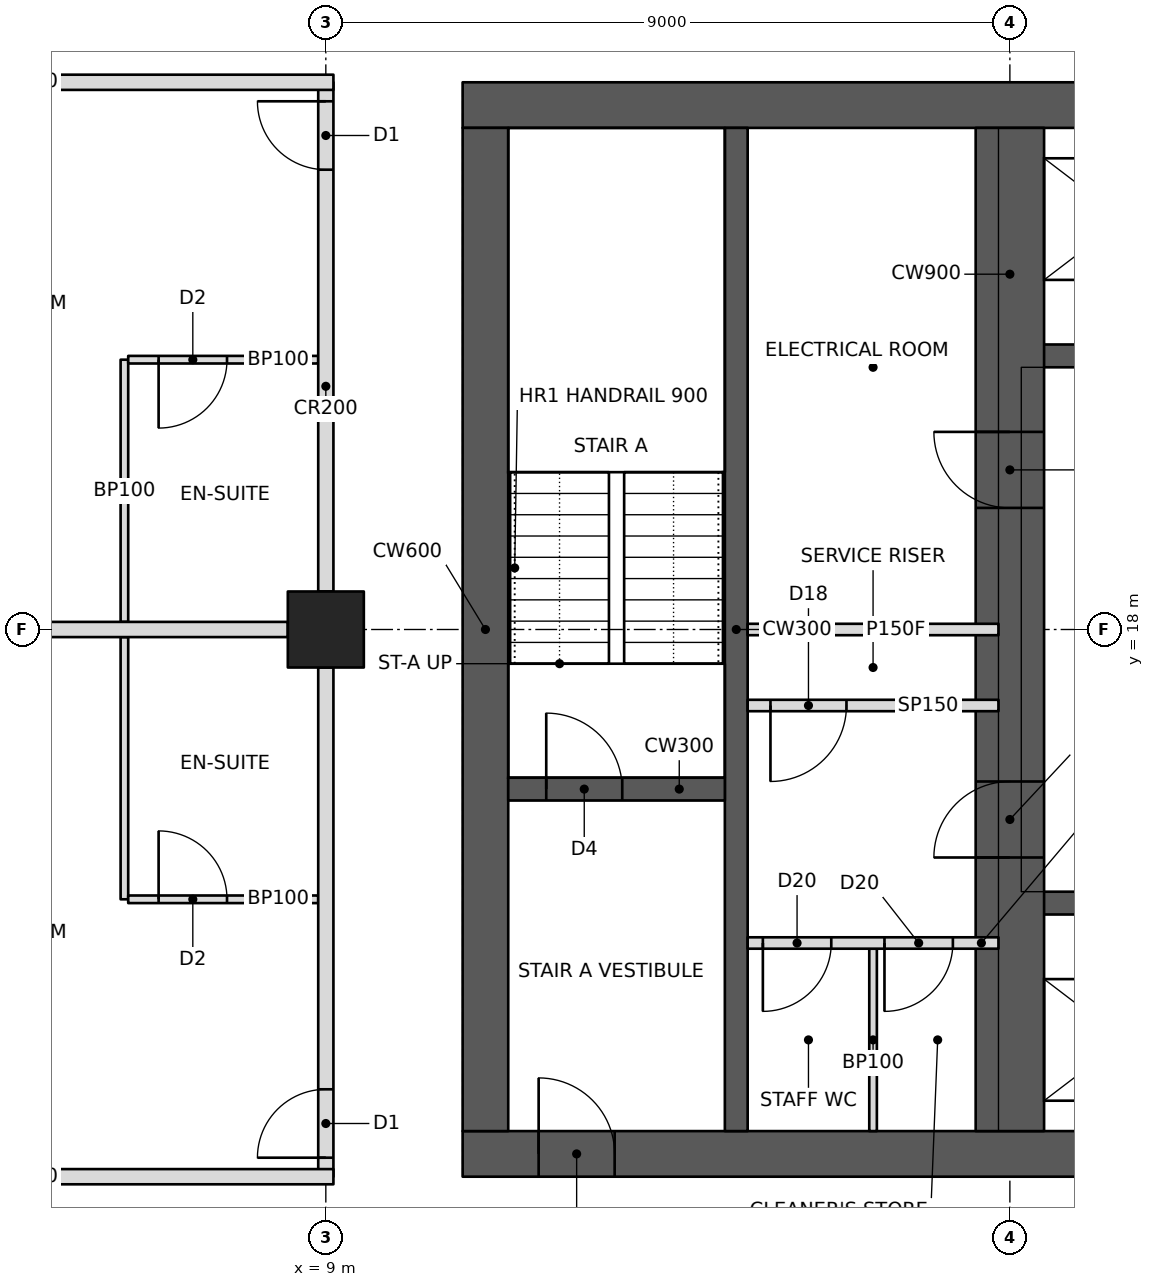
"""IFC4 building model, lengths in metres.
Left out: names, types, materials, properties, quantities, classifications, styles, units other than length and angle.
Written with IfcOpenShell. Run it as: python <this file> out.ifc"""

import sys

from ifc_helpers import new_model, si_unit, direction, frame, frame_2d, origin, origin_2d, place, context, subcontext, project, spatial, rectangle, hollow_rectangle, extrude, element, fill, save


model = new_model("IFC4")
c1 = context("Model", 3, precision=1e-05, world=origin(), true_north=direction((0.0, 1.0)))
c2 = subcontext(c1, "Body", "Model", "MODEL_VIEW")
j1 = project(units=[si_unit("LENGTHUNIT", "METRE"), si_unit("PLANEANGLEUNIT", "RADIAN")], contexts=[c1])
p1 = place(None, origin())
s1 = spatial("IfcSite", under=j1, at=p1, CompositionType="ELEMENT")
p2 = place(p1, origin())
s2 = spatial("IfcBuilding", under=s1, at=p2, CompositionType="ELEMENT")
p3 = place(p2, frame((0.0, 0.0, 94.2)))
s3 = spatial("IfcBuildingStorey", under=s2, at=p3, CompositionType="ELEMENT", Elevation=94.2)
p4 = place(p3, frame((9.0, 18.0, 0.0), z_axis=(0.0, 0.0, 1.0), x_axis=(1.0, 0.0, 0.0)))
e1 = element("IfcColumn", 1, at=p4, inside=s3, PredefinedType="COLUMN", context=c2, shape_type="SweptSolid", body=[
    extrude(hollow_rectangle(XDim=1.0, YDim=1.0, WallThickness=0.1, at=origin_2d()), origin(), (0.0, 0.0, 1.0), 3.4),
])
p5 = place(p3, frame((10.8, 11.1, 0.0), z_axis=(0.0, 0.0, 1.0), x_axis=(1.0, 0.0, 0.0)))
e2 = element("IfcWall", 2, at=p5, inside=s3, PredefinedType="SHEAR", context=c2, shape_type="SweptSolid", body=[
    extrude(rectangle(XDim=23.4, YDim=0.6, at=frame_2d((11.7, 0.0))), origin(), (0.0, 0.0, 1.0), 3.4),
])
p6 = place(p5, frame((1.0, 0.0, 0.0)))
e3 = element("IfcOpeningElement", 3, at=p6, cuts=e2, PredefinedType="OPENING", context=c2, shape_type="SweptSolid", body=[
    extrude(rectangle(XDim=1.0, YDim=2.1, at=frame_2d((0.5, 1.05))), frame((0.0, 0.31, 0.0), z_axis=(0.0, -1.0, 0.0), x_axis=(1.0, 0.0, 0.0)), (0.0, 0.0, 1.0), 0.62),
])
p7 = place(p5, frame((17.2, 0.0, 0.0)))
e4 = element("IfcOpeningElement", 4, at=p7, cuts=e2, PredefinedType="OPENING", context=c2, shape_type="SweptSolid", body=[
    extrude(rectangle(XDim=1.8, YDim=2.1, at=frame_2d((0.9, 1.05))), frame((0.0, 0.31, 0.0), z_axis=(0.0, -1.0, 0.0), x_axis=(1.0, 0.0, 0.0)), (0.0, 0.0, 1.0), 0.62),
])
p8 = place(p3, frame((10.8, 24.9, 0.0), z_axis=(0.0, 0.0, 1.0), x_axis=(1.0, 0.0, 0.0)))
e5 = element("IfcWall", 5, at=p8, inside=s3, PredefinedType="SHEAR", context=c2, shape_type="SweptSolid", body=[
    extrude(rectangle(XDim=23.4, YDim=0.6, at=frame_2d((11.7, 0.0))), origin(), (0.0, 0.0, 1.0), 3.4),
])
p9 = place(p8, frame((17.2, 0.0, 0.0)))
e6 = element("IfcOpeningElement", 6, at=p9, cuts=e5, PredefinedType="OPENING", context=c2, shape_type="SweptSolid", body=[
    extrude(rectangle(XDim=1.8, YDim=2.1, at=frame_2d((0.9, 1.05))), frame((0.0, 0.31, 0.0), z_axis=(0.0, -1.0, 0.0), x_axis=(1.0, 0.0, 0.0)), (0.0, 0.0, 1.0), 0.62),
])
p10 = place(p8, frame((21.1, 0.0, 0.0)))
e7 = element("IfcOpeningElement", 7, at=p10, cuts=e5, PredefinedType="OPENING", context=c2, shape_type="SweptSolid", body=[
    extrude(rectangle(XDim=1.0, YDim=2.1, at=frame_2d((0.5, 1.05))), frame((0.0, 0.31, 0.0), z_axis=(0.0, -1.0, 0.0), x_axis=(1.0, 0.0, 0.0)), (0.0, 0.0, 1.0), 0.62),
])
p11 = place(p3, frame((11.1, 11.4, 0.0), z_axis=(0.0, 0.0, 1.0), x_axis=(0.0, 1.0, 0.0)))
e8 = element("IfcWall", 8, at=p11, inside=s3, PredefinedType="SHEAR", context=c2, shape_type="SweptSolid", body=[
    extrude(rectangle(XDim=13.2, YDim=0.6, at=frame_2d((6.6, 0.0))), origin(), (0.0, 0.0, 1.0), 3.4),
])
p12 = place(p3, frame((14.4, 11.4, 0.0), z_axis=(0.0, 0.0, 1.0), x_axis=(0.0, 1.0, 0.0)))
e9 = element("IfcWall", 9, at=p12, inside=s3, PredefinedType="SHEAR", context=c2, shape_type="SweptSolid", body=[
    extrude(rectangle(XDim=13.2, YDim=0.3, at=frame_2d((6.6, 0.0))), origin(), (0.0, 0.0, 1.0), 3.4),
])
p13 = place(p3, frame((11.4, 15.9, 0.0), z_axis=(0.0, 0.0, 1.0), x_axis=(1.0, 0.0, 0.0)))
e10 = element("IfcWall", 10, at=p13, inside=s3, PredefinedType="SHEAR", context=c2, shape_type="SweptSolid", body=[
    extrude(rectangle(XDim=2.85, YDim=0.3, at=frame_2d((1.425, 0.0))), origin(), (0.0, 0.0, 1.0), 3.4),
])
p14 = place(p13, frame((0.5, 0.0, 0.0)))
e11 = element("IfcOpeningElement", 11, at=p14, cuts=e10, PredefinedType="OPENING", context=c2, shape_type="SweptSolid", body=[
    extrude(rectangle(XDim=1.0, YDim=2.1, at=frame_2d((0.5, 1.05))), frame((0.0, 0.16, 0.0), z_axis=(0.0, -1.0, 0.0), x_axis=(1.0, 0.0, 0.0)), (0.0, 0.0, 1.0), 0.32),
])
p15 = place(p3, frame((18.0, 11.4, 0.0), z_axis=(0.0, 0.0, 1.0), x_axis=(0.0, 1.0, 0.0)))
e12 = element("IfcWall", 12, at=p15, inside=s3, PredefinedType="SHEAR", context=c2, shape_type="SweptSolid", body=[
    extrude(rectangle(XDim=13.2, YDim=0.9, at=frame_2d((6.6, 0.0))), origin(), (0.0, 0.0, 1.0), 3.4),
])
p16 = place(p15, frame((3.6, 0.0, 0.0)))
e13 = element("IfcOpeningElement", 13, at=p16, cuts=e12, PredefinedType="OPENING", context=c2, shape_type="SweptSolid", body=[
    extrude(rectangle(XDim=1.0, YDim=2.1, at=frame_2d((0.5, 1.05))), frame((0.0, 0.46, 0.0), z_axis=(0.0, -1.0, 0.0), x_axis=(1.0, 0.0, 0.0)), (0.0, 0.0, 1.0), 0.92),
])
p17 = place(p15, frame((8.2, 0.0, 0.0)))
e14 = element("IfcOpeningElement", 14, at=p17, cuts=e12, PredefinedType="OPENING", context=c2, shape_type="SweptSolid", body=[
    extrude(rectangle(XDim=1.0, YDim=2.1, at=frame_2d((0.5, 1.05))), frame((0.0, 0.46, 0.0), z_axis=(0.0, -1.0, 0.0), x_axis=(1.0, 0.0, 0.0)), (0.0, 0.0, 1.0), 0.92),
])
p18 = place(p3, frame((14.55, 18.0, 0.0), z_axis=(0.0, 0.0, 1.0), x_axis=(1.0, 0.0, 0.0)))
e15 = element("IfcWall", 15, at=p18, inside=s3, PredefinedType="PARTITIONING", context=c2, shape_type="SweptSolid", body=[
    extrude(rectangle(XDim=3.3, YDim=0.15, at=frame_2d((1.65, 0.0))), origin(), (0.0, 0.0, 1.0), 3.2),
])
p19 = place(p3, frame((18.15, 14.4, 0.0), z_axis=(0.0, 0.0, 1.0), x_axis=(1.0, 0.0, 0.0)))
e16 = element("IfcWall", 16, at=p19, inside=s3, PredefinedType="SHEAR", context=c2, shape_type="SweptSolid", body=[
    extrude(rectangle(XDim=9.0, YDim=0.3, at=frame_2d((4.5, 0.0))), origin(), (0.0, 0.0, 1.0), 3.4),
])
p20 = place(p19, frame((0.8, 0.0, 0.0)))
e17 = element("IfcOpeningElement", 17, at=p20, cuts=e16, PredefinedType="OPENING", context=c2, shape_type="SweptSolid", body=[
    extrude(rectangle(XDim=1.1, YDim=2.1, at=frame_2d((0.55, 1.05))), frame((0.0, 0.16, 0.0), z_axis=(0.0, -1.0, 0.0), x_axis=(1.0, 0.0, 0.0)), (0.0, 0.0, 1.0), 0.32),
])
p21 = place(p19, frame((3.8, 0.0, 0.0)))
e18 = element("IfcOpeningElement", 18, at=p21, cuts=e16, PredefinedType="OPENING", context=c2, shape_type="SweptSolid", body=[
    extrude(rectangle(XDim=1.1, YDim=2.1, at=frame_2d((0.55, 1.05))), frame((0.0, 0.16, 0.0), z_axis=(0.0, -1.0, 0.0), x_axis=(1.0, 0.0, 0.0)), (0.0, 0.0, 1.0), 0.32),
])
p22 = place(p19, frame((6.75, 0.0, 0.0)))
e19 = element("IfcOpeningElement", 19, at=p22, cuts=e16, PredefinedType="OPENING", context=c2, shape_type="SweptSolid", body=[
    extrude(rectangle(XDim=1.2, YDim=2.1, at=frame_2d((0.6, 1.05))), frame((0.0, 0.16, 0.0), z_axis=(0.0, -1.0, 0.0), x_axis=(1.0, 0.0, 0.0)), (0.0, 0.0, 1.0), 0.32),
])
p23 = place(p3, frame((18.15, 21.6, 0.0), z_axis=(0.0, 0.0, 1.0), x_axis=(1.0, 0.0, 0.0)))
e20 = element("IfcWall", 20, at=p23, inside=s3, PredefinedType="SHEAR", context=c2, shape_type="SweptSolid", body=[
    extrude(rectangle(XDim=9.0, YDim=0.3, at=frame_2d((4.5, 0.0))), origin(), (0.0, 0.0, 1.0), 3.4),
])
p24 = place(p23, frame((0.8, 0.0, 0.0)))
e21 = element("IfcOpeningElement", 21, at=p24, cuts=e20, PredefinedType="OPENING", context=c2, shape_type="SweptSolid", body=[
    extrude(rectangle(XDim=1.1, YDim=2.1, at=frame_2d((0.55, 1.05))), frame((0.0, 0.16, 0.0), z_axis=(0.0, -1.0, 0.0), x_axis=(1.0, 0.0, 0.0)), (0.0, 0.0, 1.0), 0.32),
])
p25 = place(p23, frame((3.8, 0.0, 0.0)))
e22 = element("IfcOpeningElement", 22, at=p25, cuts=e20, PredefinedType="OPENING", context=c2, shape_type="SweptSolid", body=[
    extrude(rectangle(XDim=1.1, YDim=2.1, at=frame_2d((0.55, 1.05))), frame((0.0, 0.16, 0.0), z_axis=(0.0, -1.0, 0.0), x_axis=(1.0, 0.0, 0.0)), (0.0, 0.0, 1.0), 0.32),
])
p26 = place(p23, frame((6.75, 0.0, 0.0)))
e23 = element("IfcOpeningElement", 23, at=p26, cuts=e20, PredefinedType="OPENING", context=c2, shape_type="SweptSolid", body=[
    extrude(rectangle(XDim=1.2, YDim=2.1, at=frame_2d((0.6, 1.05))), frame((0.0, 0.16, 0.0), z_axis=(0.0, -1.0, 0.0), x_axis=(1.0, 0.0, 0.0)), (0.0, 0.0, 1.0), 0.32),
])
p27 = place(p3, frame((9.0, 10.8, 0.0), z_axis=(0.0, 0.0, 1.0), x_axis=(0.0, 1.0, 0.0)))
e24 = element("IfcWall", 24, at=p27, inside=s3, PredefinedType="PARTITIONING", context=c2, shape_type="SweptSolid", body=[
    extrude(rectangle(XDim=6.7, YDim=0.2, at=frame_2d((3.35, 0.0))), origin(), (0.0, 0.0, 1.0), 2.405),
])
p28 = place(p27, frame((0.25, 0.0, 0.0)))
e25 = element("IfcOpeningElement", 25, at=p28, cuts=e24, PredefinedType="OPENING", context=c2, shape_type="SweptSolid", body=[
    extrude(rectangle(XDim=0.9, YDim=2.1, at=frame_2d((0.45, 1.05))), frame((0.0, 0.11, 0.0), z_axis=(0.0, -1.0, 0.0), x_axis=(1.0, 0.0, 0.0)), (0.0, 0.0, 1.0), 0.22),
])
p29 = place(p3, frame((9.0, 18.5, 0.0), z_axis=(0.0, 0.0, 1.0), x_axis=(0.0, 1.0, 0.0)))
e26 = element("IfcWall", 26, at=p29, inside=s3, PredefinedType="PARTITIONING", context=c2, shape_type="SweptSolid", body=[
    extrude(rectangle(XDim=6.7, YDim=0.2, at=frame_2d((3.35, 0.0))), origin(), (0.0, 0.0, 1.0), 2.405),
])
p30 = place(p29, frame((5.55, 0.0, 0.0)))
e27 = element("IfcOpeningElement", 27, at=p30, cuts=e26, PredefinedType="OPENING", context=c2, shape_type="SweptSolid", body=[
    extrude(rectangle(XDim=0.9, YDim=2.1, at=frame_2d((0.45, 1.05))), frame((0.0, 0.11, 0.0), z_axis=(0.0, -1.0, 0.0), x_axis=(1.0, 0.0, 0.0)), (0.0, 0.0, 1.0), 0.22),
])
for number, where, z_axis, x_axis in (
    (28, (1.0, 10.8, 0.0), (0.0, 0.0, 1.0), (1.0, 0.0, 0.0)),
    (29, (1.0, 25.2, 0.0), (0.0, 0.0, 1.0), (1.0, 0.0, 0.0)),
):
    element("IfcWall", number, at=place(p3, frame(where, z_axis=z_axis, x_axis=x_axis)), inside=s3, PredefinedType="PARTITIONING", context=c2, shape_type="SweptSolid", body=[
        extrude(rectangle(XDim=8.1, YDim=0.2, at=frame_2d((4.05, 0.0))), origin(), (0.0, 0.0, 1.0), 2.404),
    ])
p31 = place(p3, frame((8.5, 18.0, 0.0), z_axis=(0.0, 0.0, 1.0), x_axis=(-1.0, 0.0, 0.0)))
e30 = element("IfcWall", 30, at=p31, inside=s3, PredefinedType="PARTITIONING", context=c2, shape_type="SweptSolid", body=[
    extrude(rectangle(XDim=7.5, YDim=0.2, at=frame_2d((3.75, 0.0))), origin(), (0.0, 0.0, 1.0), 2.405),
])
p32 = place(p3, frame((6.35, 14.45, 0.0), z_axis=(0.0, 0.0, 1.0), x_axis=(0.0, 1.0, 0.0)))
e31 = element("IfcWall", 31, at=p32, inside=s3, PredefinedType="PARTITIONING", context=c2, shape_type="SweptSolid", body=[
    extrude(rectangle(XDim=3.45, YDim=0.1, at=frame_2d((1.725, 0.0))), origin(), (0.0, 0.0, 1.0), 2.404),
])
p33 = place(p3, frame((8.9, 14.45, 0.0), z_axis=(0.0, 0.0, 1.0), x_axis=(-1.0, 0.0, 0.0)))
e32 = element("IfcWall", 32, at=p33, inside=s3, PredefinedType="PARTITIONING", context=c2, shape_type="SweptSolid", body=[
    extrude(rectangle(XDim=2.5, YDim=0.1, at=frame_2d((1.25, 0.0))), origin(), (0.0, 0.0, 1.0), 2.404),
])
p34 = place(p33, frame((1.2, 0.0, 0.0)))
e33 = element("IfcOpeningElement", 33, at=p34, cuts=e32, PredefinedType="OPENING", context=c2, shape_type="SweptSolid", body=[
    extrude(rectangle(XDim=0.9, YDim=2.1, at=frame_2d((0.45, 1.05))), frame((0.0, 0.06, 0.0), z_axis=(0.0, -1.0, 0.0), x_axis=(1.0, 0.0, 0.0)), (0.0, 0.0, 1.0), 0.12),
])
p35 = place(p3, frame((6.35, 18.1, 0.0), z_axis=(0.0, 0.0, 1.0), x_axis=(0.0, 1.0, 0.0)))
e34 = element("IfcWall", 34, at=p35, inside=s3, PredefinedType="PARTITIONING", context=c2, shape_type="SweptSolid", body=[
    extrude(rectangle(XDim=3.45, YDim=0.1, at=frame_2d((1.725, 0.0))), origin(), (0.0, 0.0, 1.0), 2.404),
])
p36 = place(p3, frame((8.9, 21.55, 0.0), z_axis=(0.0, 0.0, 1.0), x_axis=(-1.0, 0.0, 0.0)))
e35 = element("IfcWall", 35, at=p36, inside=s3, PredefinedType="PARTITIONING", context=c2, shape_type="SweptSolid", body=[
    extrude(rectangle(XDim=2.5, YDim=0.1, at=frame_2d((1.25, 0.0))), origin(), (0.0, 0.0, 1.0), 2.404),
])
p37 = place(p36, frame((1.2, 0.0, 0.0)))
e36 = element("IfcOpeningElement", 36, at=p37, cuts=e35, PredefinedType="OPENING", context=c2, shape_type="SweptSolid", body=[
    extrude(rectangle(XDim=0.9, YDim=2.1, at=frame_2d((0.45, 1.05))), frame((0.0, 0.06, 0.0), z_axis=(0.0, -1.0, 0.0), x_axis=(1.0, 0.0, 0.0)), (0.0, 0.0, 1.0), 0.12),
])
p38 = place(p3, frame((14.55, 17.0, 0.0), z_axis=(0.0, 0.0, 1.0), x_axis=(1.0, 0.0, 0.0)))
e37 = element("IfcWall", 37, at=p38, inside=s3, PredefinedType="PARTITIONING", context=c2, shape_type="SweptSolid", body=[
    extrude(rectangle(XDim=3.3, YDim=0.15, at=frame_2d((1.65, 0.0))), origin(), (0.0, 0.0, 1.0), 3.2),
])
p39 = place(p38, frame((0.3, 0.0, 0.0)))
e38 = element("IfcOpeningElement", 38, at=p39, cuts=e37, PredefinedType="OPENING", context=c2, shape_type="SweptSolid", body=[
    extrude(rectangle(XDim=1.0, YDim=2.1, at=frame_2d((0.5, 1.05))), frame((0.0, 0.085, 0.0), z_axis=(0.0, -1.0, 0.0), x_axis=(1.0, 0.0, 0.0)), (0.0, 0.0, 1.0), 0.17),
])
p40 = place(p3, frame((14.55, 13.875, 0.0), z_axis=(0.0, 0.0, 1.0), x_axis=(1.0, 0.0, 0.0)))
e39 = element("IfcWall", 39, at=p40, inside=s3, PredefinedType="PARTITIONING", context=c2, shape_type="SweptSolid", body=[
    extrude(rectangle(XDim=3.3, YDim=0.15, at=frame_2d((1.65, 0.0))), origin(), (0.0, 0.0, 1.0), 3.2),
])
p41 = place(p40, frame((0.2, 0.0, 0.0)))
e40 = element("IfcOpeningElement", 40, at=p41, cuts=e39, PredefinedType="OPENING", context=c2, shape_type="SweptSolid", body=[
    extrude(rectangle(XDim=0.9, YDim=2.1, at=frame_2d((0.45, 1.05))), frame((0.0, 0.085, 0.0), z_axis=(0.0, -1.0, 0.0), x_axis=(1.0, 0.0, 0.0)), (0.0, 0.0, 1.0), 0.17),
])
p42 = place(p40, frame((1.8, 0.0, 0.0)))
e41 = element("IfcOpeningElement", 41, at=p42, cuts=e39, PredefinedType="OPENING", context=c2, shape_type="SweptSolid", body=[
    extrude(rectangle(XDim=0.9, YDim=2.1, at=frame_2d((0.45, 1.05))), frame((0.0, 0.085, 0.0), z_axis=(0.0, -1.0, 0.0), x_axis=(1.0, 0.0, 0.0)), (0.0, 0.0, 1.0), 0.17),
])
p43 = place(p3, frame((16.2, 11.4, 0.0), z_axis=(0.0, 0.0, 1.0), x_axis=(0.0, 1.0, 0.0)))
e42 = element("IfcWall", 42, at=p43, inside=s3, PredefinedType="PARTITIONING", context=c2, shape_type="SweptSolid", body=[
    extrude(rectangle(XDim=2.4, YDim=0.1, at=frame_2d((1.2, 0.0))), origin(), (0.0, 0.0, 1.0), 3.2),
])
p44 = place(p34, frame((0.9, 0.0, 0.0), z_axis=(0.0, 0.0, 1.0), x_axis=(-1.0, 0.0, 0.0)))
e43 = element("IfcDoor", 43, at=p44, inside=s3, OperationType="SINGLE_SWING_LEFT", PredefinedType="DOOR", context=c2, shape_type="SweptSolid", body=[
    extrude(rectangle(XDim=0.9, YDim=2.1, at=frame_2d((0.45, 1.05))), frame((0.0, 0.025, 0.0), z_axis=(0.0, -1.0, 0.0), x_axis=(1.0, 0.0, 0.0)), (0.0, 0.0, 1.0), 0.05),
])
fill(e33, e43)
p45 = place(p28, origin())
e44 = element("IfcDoor", 44, at=p45, inside=s3, OperationType="SINGLE_SWING_LEFT", PredefinedType="DOOR", context=c2, shape_type="SweptSolid", body=[
    extrude(rectangle(XDim=0.9, YDim=2.1, at=frame_2d((0.45, 1.05))), frame((0.0, 0.025, 0.0), z_axis=(0.0, -1.0, 0.0), x_axis=(1.0, 0.0, 0.0)), (0.0, 0.0, 1.0), 0.05),
])
fill(e25, e44)
p46 = place(p37, origin())
e45 = element("IfcDoor", 45, at=p46, inside=s3, OperationType="SINGLE_SWING_RIGHT", PredefinedType="DOOR", context=c2, shape_type="SweptSolid", body=[
    extrude(rectangle(XDim=0.9, YDim=2.1, at=frame_2d((0.45, 1.05))), frame((0.0, 0.025, 0.0), z_axis=(0.0, -1.0, 0.0), x_axis=(1.0, 0.0, 0.0)), (0.0, 0.0, 1.0), 0.05),
])
fill(e36, e45)
p47 = place(p30, origin())
e46 = element("IfcDoor", 46, at=p47, inside=s3, OperationType="SINGLE_SWING_RIGHT", PredefinedType="DOOR", context=c2, shape_type="SweptSolid", body=[
    extrude(rectangle(XDim=0.9, YDim=2.1, at=frame_2d((0.45, 1.05))), frame((0.0, 0.025, 0.0), z_axis=(0.0, -1.0, 0.0), x_axis=(1.0, 0.0, 0.0)), (0.0, 0.0, 1.0), 0.05),
])
fill(e27, e46)
p48 = place(p39, frame((1.0, 0.0, 0.0), z_axis=(0.0, 0.0, 1.0), x_axis=(-1.0, 0.0, 0.0)))
e47 = element("IfcDoor", 47, at=p48, inside=s3, OperationType="SINGLE_SWING_RIGHT", PredefinedType="DOOR", context=c2, shape_type="SweptSolid", body=[
    extrude(rectangle(XDim=1.0, YDim=2.1, at=frame_2d((0.5, 1.05))), frame((0.0, 0.025, 0.0), z_axis=(0.0, -1.0, 0.0), x_axis=(1.0, 0.0, 0.0)), (0.0, 0.0, 1.0), 0.05),
])
fill(e38, e47)
p49 = place(p41, frame((0.9, 0.0, 0.0), z_axis=(0.0, 0.0, 1.0), x_axis=(-1.0, 0.0, 0.0)))
e48 = element("IfcDoor", 48, at=p49, inside=s3, OperationType="SINGLE_SWING_RIGHT", PredefinedType="DOOR", context=c2, shape_type="SweptSolid", body=[
    extrude(rectangle(XDim=0.9, YDim=2.1, at=frame_2d((0.45, 1.05))), frame((0.0, 0.025, 0.0), z_axis=(0.0, -1.0, 0.0), x_axis=(1.0, 0.0, 0.0)), (0.0, 0.0, 1.0), 0.05),
])
fill(e40, e48)
p50 = place(p42, frame((0.9, 0.0, 0.0), z_axis=(0.0, 0.0, 1.0), x_axis=(-1.0, 0.0, 0.0)))
e49 = element("IfcDoor", 49, at=p50, inside=s3, OperationType="SINGLE_SWING_RIGHT", PredefinedType="DOOR", context=c2, shape_type="SweptSolid", body=[
    extrude(rectangle(XDim=0.9, YDim=2.1, at=frame_2d((0.45, 1.05))), frame((0.0, 0.025, 0.0), z_axis=(0.0, -1.0, 0.0), x_axis=(1.0, 0.0, 0.0)), (0.0, 0.0, 1.0), 0.05),
])
fill(e41, e49)
p51 = place(p6, origin())
e50 = element("IfcDoor", 50, at=p51, inside=s3, OperationType="SINGLE_SWING_LEFT", PredefinedType="DOOR", context=c2, shape_type="SweptSolid", body=[
    extrude(rectangle(XDim=1.0, YDim=2.1, at=frame_2d((0.5, 1.05))), frame((0.0, 0.025, 0.0), z_axis=(0.0, -1.0, 0.0), x_axis=(1.0, 0.0, 0.0)), (0.0, 0.0, 1.0), 0.05),
])
fill(e3, e50)
p52 = place(p14, origin())
e51 = element("IfcDoor", 51, at=p52, inside=s3, OperationType="SINGLE_SWING_LEFT", PredefinedType="DOOR", context=c2, shape_type="SweptSolid", body=[
    extrude(rectangle(XDim=1.0, YDim=2.1, at=frame_2d((0.5, 1.05))), frame((0.0, 0.025, 0.0), z_axis=(0.0, -1.0, 0.0), x_axis=(1.0, 0.0, 0.0)), (0.0, 0.0, 1.0), 0.05),
])
fill(e11, e51)
p53 = place(p16, origin())
e52 = element("IfcDoor", 52, at=p53, inside=s3, OperationType="SINGLE_SWING_LEFT", PredefinedType="DOOR", context=c2, shape_type="SweptSolid", body=[
    extrude(rectangle(XDim=1.0, YDim=2.1, at=frame_2d((0.5, 1.05))), frame((0.0, 0.025, 0.0), z_axis=(0.0, -1.0, 0.0), x_axis=(1.0, 0.0, 0.0)), (0.0, 0.0, 1.0), 0.05),
])
fill(e13, e52)
p54 = place(p17, origin())
e53 = element("IfcDoor", 53, at=p54, inside=s3, OperationType="SINGLE_SWING_RIGHT", PredefinedType="DOOR", context=c2, shape_type="SweptSolid", body=[
    extrude(rectangle(XDim=1.0, YDim=2.1, at=frame_2d((0.5, 1.05))), frame((0.0, 0.025, 0.0), z_axis=(0.0, -1.0, 0.0), x_axis=(1.0, 0.0, 0.0)), (0.0, 0.0, 1.0), 0.05),
])
fill(e14, e53)
save(model, sys.argv[1])
